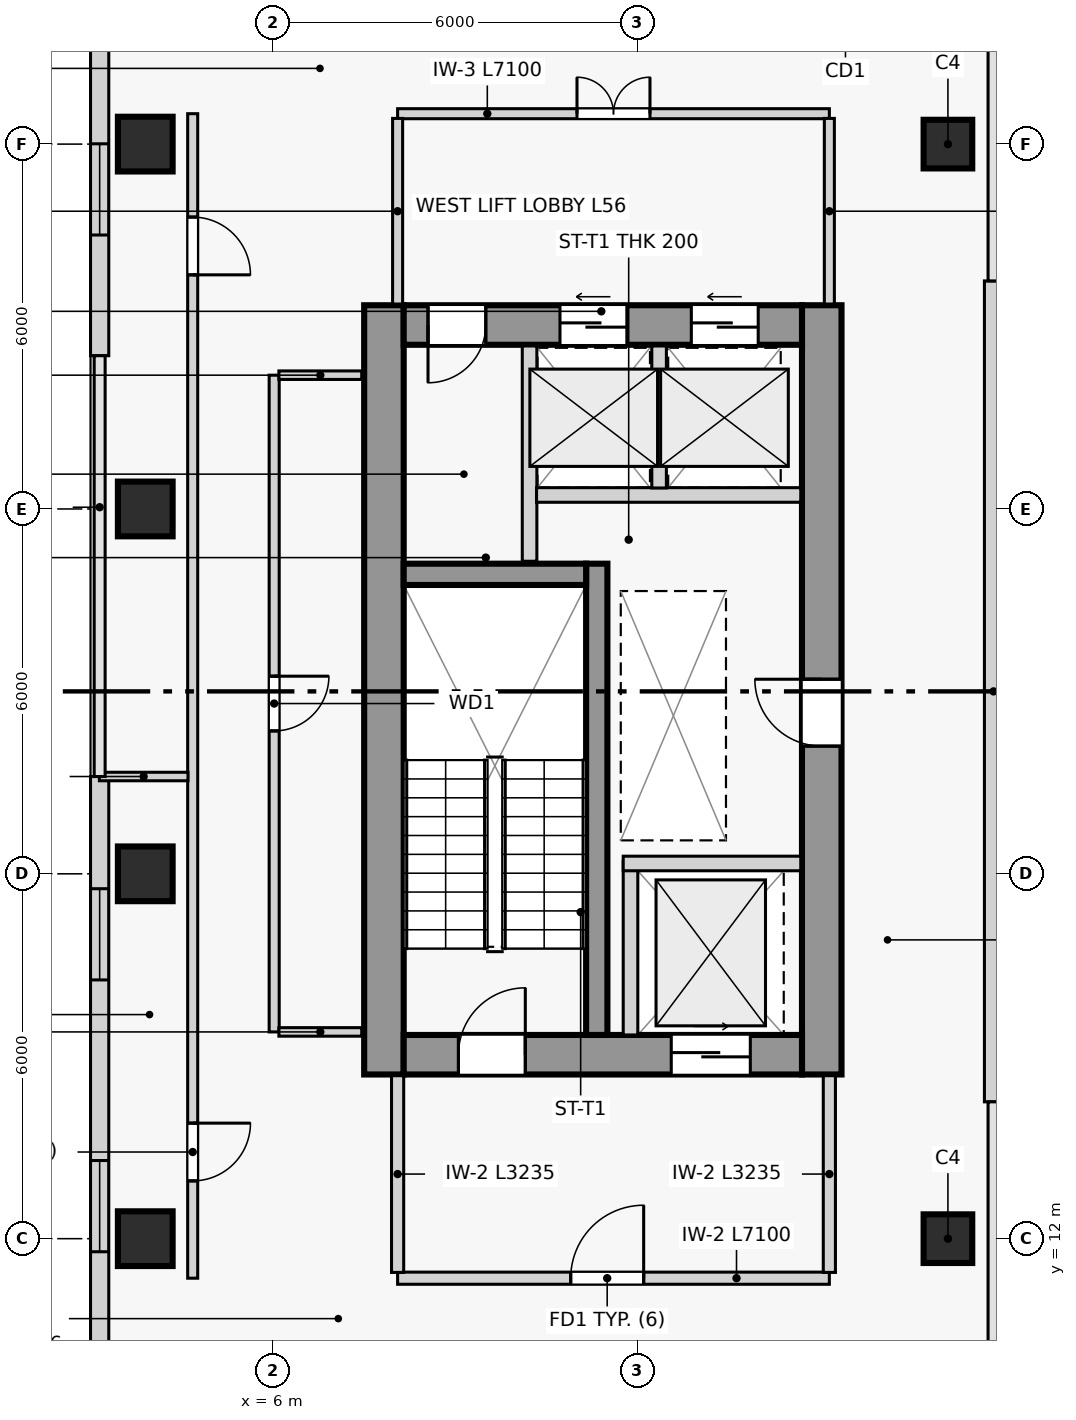
"""IFC4 building model, lengths in metres.
Left out: names, types, materials, properties, quantities, classifications, styles, units other than length and angle.
Written with IfcOpenShell. Run it as: python <this file> out.ifc"""

import sys

from ifc_helpers import new_model, si_unit, direction, frame, frame_2d, origin, origin_2d, place, context, subcontext, project, spatial, rectangle, extrude, source, transform, mapped, element, fill, save


model = new_model("IFC4")
c1 = context("Model", 3, precision=1e-05, world=origin(), true_north=direction((0.0, 1.0)))
c2 = subcontext(c1, "Body", "Model", "MODEL_VIEW")
j1 = project(units=[si_unit("LENGTHUNIT", "METRE"), si_unit("PLANEANGLEUNIT", "RADIAN")], contexts=[c1])
p1 = place(None, origin())
s1 = spatial("IfcSite", under=j1, at=p1, CompositionType="ELEMENT")
p2 = place(p1, origin())
s2 = spatial("IfcBuilding", under=s1, at=p2, CompositionType="ELEMENT")
p3 = place(p2, frame((0.0, 0.0, 213.3)))
s3 = spatial("IfcBuildingStorey", under=s2, at=p3, CompositionType="ELEMENT", Elevation=213.3)
p4 = place(p3, frame((7.825, 14.7, 0.0), z_axis=(0.0, 0.0, 1.0), x_axis=(0.0, 1.0, 0.0)))
e1 = element("IfcWall", 1, at=p4, inside=s3, PredefinedType="SHEAR", context=c2, shape_type="SweptSolid", body=[
    extrude(rectangle(XDim=12.65, YDim=0.65, at=frame_2d((6.325, 0.0))), origin(), (0.0, 0.0, 1.0), 3.6),
])
p5 = place(p3, frame((15.025, 14.7, 0.0), z_axis=(0.0, 0.0, 1.0), x_axis=(0.0, 1.0, 0.0)))
e2 = element("IfcWall", 2, at=p5, inside=s3, PredefinedType="SHEAR", context=c2, shape_type="SweptSolid", body=[
    extrude(rectangle(XDim=12.65, YDim=0.65, at=frame_2d((6.325, 0.0))), origin(), (0.0, 0.0, 1.0), 3.6),
])
p6 = place(p5, frame((5.4, 0.0, 0.0)))
e3 = element("IfcOpeningElement", 3, at=p6, cuts=e2, PredefinedType="OPENING", context=c2, shape_type="SweptSolid", body=[
    extrude(rectangle(XDim=1.1, YDim=2.2, at=frame_2d((0.55, 1.1))), frame((0.0, 0.335, 0.0), z_axis=(0.0, -1.0, 0.0), x_axis=(1.0, 0.0, 0.0)), (0.0, 0.0, 1.0), 0.67),
])
p7 = place(p3, frame((8.15, 15.025, 0.0), z_axis=(0.0, 0.0, 1.0), x_axis=(1.0, 0.0, 0.0)))
e4 = element("IfcWall", 4, at=p7, inside=s3, PredefinedType="SHEAR", context=c2, shape_type="SweptSolid", body=[
    extrude(rectangle(XDim=6.55, YDim=0.65, at=frame_2d((3.275, 0.0))), origin(), (0.0, 0.0, 1.0), 3.6),
])
p8 = place(p7, frame((0.9, 0.0, 0.0)))
e5 = element("IfcOpeningElement", 5, at=p8, cuts=e4, PredefinedType="OPENING", context=c2, shape_type="SweptSolid", body=[
    extrude(rectangle(XDim=1.1, YDim=2.2, at=frame_2d((0.55, 1.1))), frame((0.0, 0.335, 0.0), z_axis=(0.0, -1.0, 0.0), x_axis=(1.0, 0.0, 0.0)), (0.0, 0.0, 1.0), 0.67),
])
p9 = place(p7, frame((4.4, 0.0, 0.0)))
e6 = element("IfcOpeningElement", 6, at=p9, cuts=e4, PredefinedType="OPENING", context=c2, shape_type="SweptSolid", body=[
    extrude(rectangle(XDim=1.3, YDim=2.2, at=frame_2d((0.65, 1.1))), frame((0.0, 0.335, 0.0), z_axis=(0.0, -1.0, 0.0), x_axis=(1.0, 0.0, 0.0)), (0.0, 0.0, 1.0), 0.67),
])
p10 = place(p3, frame((8.15, 27.025, 0.0), z_axis=(0.0, 0.0, 1.0), x_axis=(1.0, 0.0, 0.0)))
e7 = element("IfcWall", 7, at=p10, inside=s3, PredefinedType="SHEAR", context=c2, shape_type="SweptSolid", body=[
    extrude(rectangle(XDim=6.55, YDim=0.65, at=frame_2d((3.275, 0.0))), origin(), (0.0, 0.0, 1.0), 3.6),
])
p11 = place(p10, frame((0.4, 0.0, 0.0)))
e8 = element("IfcOpeningElement", 8, at=p11, cuts=e7, PredefinedType="OPENING", context=c2, shape_type="SweptSolid", body=[
    extrude(rectangle(XDim=0.95, YDim=2.1, at=frame_2d((0.475, 1.05))), frame((0.0, 0.335, 0.0), z_axis=(0.0, -1.0, 0.0), x_axis=(1.0, 0.0, 0.0)), (0.0, 0.0, 1.0), 0.67),
])
p12 = place(p10, frame((2.57, 0.0, 0.0)))
e9 = element("IfcOpeningElement", 9, at=p12, cuts=e7, PredefinedType="OPENING", context=c2, shape_type="SweptSolid", body=[
    extrude(rectangle(XDim=1.1, YDim=2.2, at=frame_2d((0.55, 1.1))), frame((0.0, 0.335, 0.0), z_axis=(0.0, -1.0, 0.0), x_axis=(1.0, 0.0, 0.0)), (0.0, 0.0, 1.0), 0.67),
])
p13 = place(p10, frame((4.73, 0.0, 0.0)))
e10 = element("IfcOpeningElement", 10, at=p13, cuts=e7, PredefinedType="OPENING", context=c2, shape_type="SweptSolid", body=[
    extrude(rectangle(XDim=1.1, YDim=2.2, at=frame_2d((0.55, 1.1))), frame((0.0, 0.335, 0.0), z_axis=(0.0, -1.0, 0.0), x_axis=(1.0, 0.0, 0.0)), (0.0, 0.0, 1.0), 0.67),
])
p14 = place(p3, frame((11.325, 15.35, 0.0), z_axis=(0.0, 0.0, 1.0), x_axis=(0.0, 1.0, 0.0)))
e11 = element("IfcWall", 11, at=p14, inside=s3, PredefinedType="SHEAR", context=c2, shape_type="SweptSolid", body=[
    extrude(rectangle(XDim=7.75, YDim=0.35, at=frame_2d((3.875, 0.0))), origin(), (0.0, 0.0, 1.0), 3.6),
])
p15 = place(p3, frame((8.15, 22.925, 0.0), z_axis=(0.0, 0.0, 1.0), x_axis=(1.0, 0.0, 0.0)))
e12 = element("IfcWall", 12, at=p15, inside=s3, PredefinedType="SHEAR", context=c2, shape_type="SweptSolid", body=[
    extrude(rectangle(XDim=3.0, YDim=0.35, at=frame_2d((1.5, 0.0))), origin(), (0.0, 0.0, 1.0), 3.6),
])
m1 = source(origin(), c2, "Body", "SweptSolid", [
    extrude(rectangle(XDim=0.9, YDim=0.9, at=origin_2d()), origin(), (0.0, 0.0, 1.0), 3.6),
])
for number, where, z_axis, x_axis in (
    (13, (3.9, 12.0, 0.0), (0.0, 0.0, 1.0), (1.0, 0.0, 0.0)),
    (14, (3.9, 18.0, 0.0), (0.0, 0.0, 1.0), (1.0, 0.0, 0.0)),
    (15, (3.9, 24.0, 0.0), (0.0, 0.0, 1.0), (1.0, 0.0, 0.0)),
    (16, (3.9, 30.0, 0.0), (0.0, 0.0, 1.0), (1.0, 0.0, 0.0)),
):
    element("IfcColumn", number, at=place(p3, frame(where, z_axis=z_axis, x_axis=x_axis)), inside=s3, PredefinedType="COLUMN", context=c2, shape_type="MappedRepresentation", body=[
        mapped(m1, transform((0.0, 0.0, 0.0), scale=1.0)),
    ])
m2 = source(origin(), c2, "Body", "SweptSolid", [
    extrude(rectangle(XDim=0.8, YDim=0.8, at=origin_2d()), origin(), (0.0, 0.0, 1.0), 3.6),
])
for number, where, z_axis, x_axis in (
    (17, (17.1, 12.0, 0.0), (0.0, 0.0, 1.0), (1.0, 0.0, 0.0)),
    (18, (17.1, 30.0, 0.0), (0.0, 0.0, 1.0), (1.0, 0.0, 0.0)),
):
    element("IfcColumn", number, at=place(p3, frame(where, z_axis=z_axis, x_axis=x_axis)), inside=s3, PredefinedType="COLUMN", context=c2, shape_type="MappedRepresentation", body=[
        mapped(m2, transform((0.0, 0.0, 0.0), scale=1.0)),
    ])
p16 = place(p3, frame((17.85, 14.25, 0.0), z_axis=(0.0, 0.0, 1.0), x_axis=(0.0, 1.0, 0.0)))
e19 = element("IfcWall", 19, at=p16, inside=s3, PredefinedType="SOLIDWALL", context=c2, shape_type="SweptSolid", body=[
    extrude(rectangle(XDim=13.5, YDim=0.3, at=frame_2d((6.75, 0.0))), origin(), (0.0, 0.0, 1.0), 2.95),
])
p17 = place(p3, frame((3.15, 38.25, 0.0), z_axis=(0.0, 0.0, 1.0), x_axis=(0.0, -1.0, 0.0)))
e20 = element("IfcWall", 20, at=p17, inside=s3, PredefinedType="SOLIDWALL", context=c2, shape_type="SweptSolid", body=[
    extrude(rectangle(XDim=11.73, YDim=0.3, at=frame_2d((5.865, 0.0))), origin(), (0.0, 0.0, 1.0), 2.95),
])
p18 = place(p17, frame((2.48, 0.0, 0.85)))
e21 = element("IfcOpeningElement", 21, at=p18, cuts=e20, PredefinedType="OPENING", context=c2, shape_type="SweptSolid", body=[
    extrude(rectangle(XDim=1.5, YDim=1.8, at=frame_2d((0.75, 0.9))), frame((0.0, 0.16, 0.0), z_axis=(0.0, -1.0, 0.0), x_axis=(1.0, 0.0, 0.0)), (0.0, 0.0, 1.0), 0.32),
])
p19 = place(p17, frame((8.245, 0.0, 0.85)))
e22 = element("IfcOpeningElement", 22, at=p19, cuts=e20, PredefinedType="OPENING", context=c2, shape_type="SweptSolid", body=[
    extrude(rectangle(XDim=1.5, YDim=1.8, at=frame_2d((0.75, 0.9))), frame((0.0, 0.16, 0.0), z_axis=(0.0, -1.0, 0.0), x_axis=(1.0, 0.0, 0.0)), (0.0, 0.0, 1.0), 0.32),
])
p20 = place(p3, frame((3.15, 19.6, 0.0), z_axis=(0.0, 0.0, 1.0), x_axis=(0.0, -1.0, 0.0)))
e23 = element("IfcWall", 23, at=p20, inside=s3, PredefinedType="SOLIDWALL", context=c2, shape_type="SweptSolid", body=[
    extrude(rectangle(XDim=15.85, YDim=0.3, at=frame_2d((7.925, 0.0))), origin(), (0.0, 0.0, 1.0), 2.95),
])
p21 = place(p20, frame((1.845, 0.0, 0.85)))
e24 = element("IfcOpeningElement", 24, at=p21, cuts=e23, PredefinedType="OPENING", context=c2, shape_type="SweptSolid", body=[
    extrude(rectangle(XDim=1.5, YDim=1.8, at=frame_2d((0.75, 0.9))), frame((0.0, 0.16, 0.0), z_axis=(0.0, -1.0, 0.0), x_axis=(1.0, 0.0, 0.0)), (0.0, 0.0, 1.0), 0.32),
])
p22 = place(p20, frame((6.315, 0.0, 0.85)))
e25 = element("IfcOpeningElement", 25, at=p22, cuts=e23, PredefinedType="OPENING", context=c2, shape_type="SweptSolid", body=[
    extrude(rectangle(XDim=1.5, YDim=1.8, at=frame_2d((0.75, 0.9))), frame((0.0, 0.16, 0.0), z_axis=(0.0, -1.0, 0.0), x_axis=(1.0, 0.0, 0.0)), (0.0, 0.0, 1.0), 0.32),
])
p23 = place(p20, frame((11.905, 0.0, 0.85)))
e26 = element("IfcOpeningElement", 26, at=p23, cuts=e23, PredefinedType="OPENING", context=c2, shape_type="SweptSolid", body=[
    extrude(rectangle(XDim=1.5, YDim=1.8, at=frame_2d((0.75, 0.9))), frame((0.0, 0.16, 0.0), z_axis=(0.0, -1.0, 0.0), x_axis=(1.0, 0.0, 0.0)), (0.0, 0.0, 1.0), 0.32),
])
p24 = place(p3, frame((11.88, 15.35, 0.0), z_axis=(0.0, 0.0, 1.0), x_axis=(0.0, 1.0, 0.0)))
e27 = element("IfcWall", 27, at=p24, inside=s3, PredefinedType="PARTITIONING", context=c2, shape_type="SweptSolid", body=[
    extrude(rectangle(XDim=2.85, YDim=0.24, at=frame_2d((1.425, 0.0))), origin(), (0.0, 0.0, 1.0), 2.95),
])
p25 = place(p3, frame((11.76, 18.17, 0.0), z_axis=(0.0, 0.0, 1.0), x_axis=(1.0, 0.0, 0.0)))
e28 = element("IfcWall", 28, at=p25, inside=s3, PredefinedType="PARTITIONING", context=c2, shape_type="SweptSolid", body=[
    extrude(rectangle(XDim=2.92, YDim=0.24, at=frame_2d((1.46, 0.0))), origin(), (0.0, 0.0, 1.0), 2.95),
])
p26 = place(p3, frame((8.05, 11.35, 0.0), z_axis=(0.0, 0.0, 1.0), x_axis=(1.0, 0.0, 0.0)))
e29 = element("IfcWall", 29, at=p26, inside=s3, PredefinedType="PARTITIONING", context=c2, shape_type="SweptSolid", body=[
    extrude(rectangle(XDim=7.1, YDim=0.2, at=frame_2d((3.55, 0.0))), origin(), (0.0, 0.0, 1.0), 2.95),
])
p27 = place(p26, frame((2.846, 0.0, 0.0)))
e30 = element("IfcOpeningElement", 30, at=p27, cuts=e29, PredefinedType="OPENING", context=c2, shape_type="SweptSolid", body=[
    extrude(rectangle(XDim=1.2, YDim=2.2, at=frame_2d((0.6, 1.1))), frame((0.0, 0.11, 0.0), z_axis=(0.0, -1.0, 0.0), x_axis=(1.0, 0.0, 0.0)), (0.0, 0.0, 1.0), 0.22),
])
for number, where, z_axis, x_axis in (
    (31, (8.05, 11.445, 0.0), (0.0, 0.0, 1.0), (0.0, 1.0, 0.0)),
    (32, (15.15, 11.445, 0.0), (0.0, 0.0, 1.0), (0.0, 1.0, 0.0)),
):
    element("IfcWall", number, at=place(p3, frame(where, z_axis=z_axis, x_axis=x_axis)), inside=s3, PredefinedType="PARTITIONING", context=c2, shape_type="SweptSolid", body=[
        extrude(rectangle(XDim=3.235, YDim=0.2, at=frame_2d((1.617, 0.0))), origin(), (0.0, 0.0, 1.0), 2.95),
    ])
p28 = place(p3, frame((10.22, 23.14, 0.0), z_axis=(0.0, 0.0, 1.0), x_axis=(0.0, 1.0, 0.0)))
e33 = element("IfcWall", 33, at=p28, inside=s3, PredefinedType="PARTITIONING", context=c2, shape_type="SweptSolid", body=[
    extrude(rectangle(XDim=3.54, YDim=0.24, at=frame_2d((1.77, 0.0))), origin(), (0.0, 0.0, 1.0), 2.95),
])
p29 = place(p3, frame((10.335, 24.23, 0.0), z_axis=(0.0, 0.0, 1.0), x_axis=(1.0, 0.0, 0.0)))
e34 = element("IfcWall", 34, at=p29, inside=s3, PredefinedType="PARTITIONING", context=c2, shape_type="SweptSolid", body=[
    extrude(rectangle(XDim=4.345, YDim=0.24, at=frame_2d((2.172, 0.0))), origin(), (0.0, 0.0, 1.0), 2.95),
])
p30 = place(p3, frame((12.35, 24.345, 0.0), z_axis=(0.0, 0.0, 1.0), x_axis=(0.0, 1.0, 0.0)))
e35 = element("IfcWall", 35, at=p30, inside=s3, PredefinedType="PARTITIONING", context=c2, shape_type="SweptSolid", body=[
    extrude(rectangle(XDim=2.335, YDim=0.24, at=frame_2d((1.167, 0.0))), origin(), (0.0, 0.0, 1.0), 2.95),
])
p31 = place(p3, frame((8.05, 30.5, 0.0), z_axis=(0.0, 0.0, 1.0), x_axis=(1.0, 0.0, 0.0)))
e36 = element("IfcWall", 36, at=p31, inside=s3, PredefinedType="PARTITIONING", context=c2, shape_type="SweptSolid", body=[
    extrude(rectangle(XDim=7.1, YDim=0.165, at=frame_2d((3.55, 0.0))), origin(), (0.0, 0.0, 1.0), 2.95),
])
p32 = place(p31, frame((2.95, 0.0, 0.0)))
e37 = element("IfcOpeningElement", 37, at=p32, cuts=e36, PredefinedType="OPENING", context=c2, shape_type="SweptSolid", body=[
    extrude(rectangle(XDim=1.2, YDim=2.2, at=frame_2d((0.6, 1.1))), frame((0.0, 0.093, 0.0), z_axis=(0.0, -1.0, 0.0), x_axis=(1.0, 0.0, 0.0)), (0.0, 0.0, 1.0), 0.185),
])
for number, where, z_axis, x_axis in (
    (38, (8.05, 27.37, 0.0), (0.0, 0.0, 1.0), (0.0, 1.0, 0.0)),
    (39, (15.15, 27.37, 0.0), (0.0, 0.0, 1.0), (0.0, 1.0, 0.0)),
):
    element("IfcWall", number, at=place(p3, frame(where, z_axis=z_axis, x_axis=x_axis)), inside=s3, PredefinedType="PARTITIONING", context=c2, shape_type="SweptSolid", body=[
        extrude(rectangle(XDim=3.052, YDim=0.165, at=frame_2d((1.526, 0.0))), origin(), (0.0, 0.0, 1.0), 2.95),
    ])
p33 = place(p3, frame((6.02, 15.4, 0.0), z_axis=(0.0, 0.0, 1.0), x_axis=(0.0, 1.0, 0.0)))
e40 = element("IfcWall", 40, at=p33, inside=s3, PredefinedType="PARTITIONING", context=c2, shape_type="SweptSolid", body=[
    extrude(rectangle(XDim=10.8, YDim=0.165, at=frame_2d((5.4, 0.0))), origin(), (0.0, 0.0, 1.0), 2.95),
])
p34 = place(p33, frame((4.95, 0.0, 0.0)))
e41 = element("IfcOpeningElement", 41, at=p34, cuts=e40, PredefinedType="OPENING", context=c2, shape_type="SweptSolid", body=[
    extrude(rectangle(XDim=0.9, YDim=2.1, at=frame_2d((0.45, 1.05))), frame((0.0, 0.093, 0.0), z_axis=(0.0, -1.0, 0.0), x_axis=(1.0, 0.0, 0.0)), (0.0, 0.0, 1.0), 0.185),
])
for number, where, z_axis, x_axis in (
    (42, (6.097, 15.4, 0.0), (0.0, 0.0, 1.0), (1.0, 0.0, 0.0)),
    (43, (6.097, 26.2, 0.0), (0.0, 0.0, 1.0), (1.0, 0.0, 0.0)),
):
    element("IfcWall", number, at=place(p3, frame(where, z_axis=z_axis, x_axis=x_axis)), inside=s3, PredefinedType="PARTITIONING", context=c2, shape_type="SweptSolid", body=[
        extrude(rectangle(XDim=1.363, YDim=0.14, at=frame_2d((0.681, 0.0))), origin(), (0.0, 0.0, 1.0), 2.95),
    ])
p35 = place(p3, frame((4.68, 11.35, 0.0), z_axis=(0.0, 0.0, 1.0), x_axis=(0.0, 1.0, 0.0)))
e44 = element("IfcWall", 44, at=p35, inside=s3, PredefinedType="PARTITIONING", context=c2, shape_type="SweptSolid", body=[
    extrude(rectangle(XDim=19.15, YDim=0.165, at=frame_2d((9.575, 0.0))), origin(), (0.0, 0.0, 1.0), 2.95),
])
p36 = place(p35, frame((1.6, 0.0, 0.0)))
e45 = element("IfcOpeningElement", 45, at=p36, cuts=e44, PredefinedType="OPENING", context=c2, shape_type="SweptSolid", body=[
    extrude(rectangle(XDim=0.95, YDim=2.1, at=frame_2d((0.475, 1.05))), frame((0.0, 0.093, 0.0), z_axis=(0.0, -1.0, 0.0), x_axis=(1.0, 0.0, 0.0)), (0.0, 0.0, 1.0), 0.185),
])
p37 = place(p35, frame((16.5, 0.0, 0.0)))
e46 = element("IfcOpeningElement", 46, at=p37, cuts=e44, PredefinedType="OPENING", context=c2, shape_type="SweptSolid", body=[
    extrude(rectangle(XDim=0.95, YDim=2.1, at=frame_2d((0.475, 1.05))), frame((0.0, 0.093, 0.0), z_axis=(0.0, -1.0, 0.0), x_axis=(1.0, 0.0, 0.0)), (0.0, 0.0, 1.0), 0.185),
])
p38 = place(p3, frame((3.145, 19.6, 0.0), z_axis=(0.0, 0.0, 1.0), x_axis=(1.0, 0.0, 0.0)))
e47 = element("IfcWall", 47, at=p38, inside=s3, PredefinedType="PARTITIONING", context=c2, shape_type="SweptSolid", body=[
    extrude(rectangle(XDim=1.458, YDim=0.14, at=frame_2d((0.729, 0.0))), origin(), (0.0, 0.0, 1.0), 2.95),
])
m3 = source(origin(), c2, "Body", "SweptSolid", [
    extrude(rectangle(XDim=1.5, YDim=1.8, at=frame_2d((0.75, 0.9))), frame((0.0, 0.03, 0.0), z_axis=(0.0, -1.0, 0.0), x_axis=(1.0, 0.0, 0.0)), (0.0, 0.0, 1.0), 0.06),
])
p39 = place(p19, origin())
e48 = element("IfcWindow", 48, at=p39, inside=s3, PartitioningType="SINGLE_PANEL", PredefinedType="WINDOW", context=c2, shape_type="MappedRepresentation", body=[
    mapped(m3, transform((0.0, 0.0, 0.0), scale=1.0)),
])
fill(e22, e48)
p40 = place(p21, origin())
e49 = element("IfcWindow", 49, at=p40, inside=s3, PartitioningType="SINGLE_PANEL", PredefinedType="WINDOW", context=c2, shape_type="MappedRepresentation", body=[
    mapped(m3, transform((0.0, 0.0, 0.0), scale=1.0)),
])
fill(e24, e49)
p41 = place(p22, origin())
e50 = element("IfcWindow", 50, at=p41, inside=s3, PartitioningType="SINGLE_PANEL", PredefinedType="WINDOW", context=c2, shape_type="MappedRepresentation", body=[
    mapped(m3, transform((0.0, 0.0, 0.0), scale=1.0)),
])
fill(e25, e50)
m4 = source(origin(), c2, "Body", "SweptSolid", [
    extrude(rectangle(XDim=1.1, YDim=2.2, at=frame_2d((0.55, 1.1))), frame((0.0, 0.025, 0.0), z_axis=(0.0, -1.0, 0.0), x_axis=(1.0, 0.0, 0.0)), (0.0, 0.0, 1.0), 0.05),
])
p42 = place(p8, origin())
e51 = element("IfcDoor", 51, at=p42, inside=s3, OperationType="SINGLE_SWING_RIGHT", PredefinedType="DOOR", context=c2, shape_type="MappedRepresentation", body=[
    mapped(m4, transform((0.0, 0.0, 0.0), scale=1.0)),
])
fill(e5, e51)
m5 = source(origin(), c2, "Body", "SweptSolid", [
    extrude(rectangle(XDim=1.3, YDim=2.2, at=frame_2d((0.65, 1.1))), frame((0.0, 0.025, 0.0), z_axis=(0.0, -1.0, 0.0), x_axis=(1.0, 0.0, 0.0)), (0.0, 0.0, 1.0), 0.05),
])
p43 = place(p9, origin())
e52 = element("IfcDoor", 52, at=p43, inside=s3, OperationType="SLIDING_TO_RIGHT", PredefinedType="DOOR", context=c2, shape_type="MappedRepresentation", body=[
    mapped(m5, transform((0.0, 0.0, 0.0), scale=1.0)),
])
fill(e6, e52)
m6 = source(origin(), c2, "Body", "SweptSolid", [
    extrude(rectangle(XDim=1.2, YDim=2.2, at=frame_2d((0.6, 1.1))), frame((0.0, 0.025, 0.0), z_axis=(0.0, -1.0, 0.0), x_axis=(1.0, 0.0, 0.0)), (0.0, 0.0, 1.0), 0.05),
])
p44 = place(p27, origin())
e53 = element("IfcDoor", 53, at=p44, inside=s3, OperationType="SINGLE_SWING_RIGHT", PredefinedType="DOOR", context=c2, shape_type="MappedRepresentation", body=[
    mapped(m6, transform((0.0, 0.0, 0.0), scale=1.0)),
])
fill(e30, e53)
m7 = source(origin(), c2, "Body", "SweptSolid", [
    extrude(rectangle(XDim=0.95, YDim=2.1, at=frame_2d((0.475, 1.05))), frame((0.0, 0.025, 0.0), z_axis=(0.0, -1.0, 0.0), x_axis=(1.0, 0.0, 0.0)), (0.0, 0.0, 1.0), 0.05),
])
p45 = place(p11, frame((0.95, 0.0, 0.0), z_axis=(0.0, 0.0, 1.0), x_axis=(-1.0, 0.0, 0.0)))
e54 = element("IfcDoor", 54, at=p45, inside=s3, OperationType="SINGLE_SWING_RIGHT", PredefinedType="DOOR", context=c2, shape_type="MappedRepresentation", body=[
    mapped(m7, transform((0.0, 0.0, 0.0), scale=1.0)),
])
fill(e8, e54)
m8 = source(origin(), c2, "Body", "SweptSolid", [
    extrude(rectangle(XDim=1.1, YDim=2.2, at=frame_2d((0.55, 1.1))), frame((0.0, 0.025, 0.0), z_axis=(0.0, -1.0, 0.0), x_axis=(1.0, 0.0, 0.0)), (0.0, 0.0, 1.0), 0.05),
])
p46 = place(p12, origin())
e55 = element("IfcDoor", 55, at=p46, inside=s3, OperationType="SLIDING_TO_LEFT", PredefinedType="DOOR", context=c2, shape_type="MappedRepresentation", body=[
    mapped(m8, transform((0.0, 0.0, 0.0), scale=1.0)),
])
fill(e9, e55)
p47 = place(p13, origin())
e56 = element("IfcDoor", 56, at=p47, inside=s3, OperationType="SLIDING_TO_LEFT", PredefinedType="DOOR", context=c2, shape_type="MappedRepresentation", body=[
    mapped(m8, transform((0.0, 0.0, 0.0), scale=1.0)),
])
fill(e10, e56)
p48 = place(p32, origin())
e57 = element("IfcDoor", 57, at=p48, inside=s3, OperationType="DOUBLE_DOOR_SINGLE_SWING", PredefinedType="DOOR", context=c2, shape_type="MappedRepresentation", body=[
    mapped(m6, transform((0.0, 0.0, 0.0), scale=1.0)),
])
fill(e37, e57)
p49 = place(p6, origin())
e58 = element("IfcDoor", 58, at=p49, inside=s3, OperationType="SINGLE_SWING_RIGHT", PredefinedType="DOOR", context=c2, shape_type="MappedRepresentation", body=[
    mapped(m4, transform((0.0, 0.0, 0.0), scale=1.0)),
])
fill(e3, e58)
m9 = source(origin(), c2, "Body", "SweptSolid", [
    extrude(rectangle(XDim=0.9, YDim=2.1, at=frame_2d((0.45, 1.05))), frame((0.0, 0.025, 0.0), z_axis=(0.0, -1.0, 0.0), x_axis=(1.0, 0.0, 0.0)), (0.0, 0.0, 1.0), 0.05),
])
p50 = place(p34, frame((0.9, 0.0, 0.0), z_axis=(0.0, 0.0, 1.0), x_axis=(-1.0, 0.0, 0.0)))
e59 = element("IfcDoor", 59, at=p50, inside=s3, OperationType="SINGLE_SWING_LEFT", PredefinedType="DOOR", context=c2, shape_type="MappedRepresentation", body=[
    mapped(m9, transform((0.0, 0.0, 0.0), scale=1.0)),
])
fill(e41, e59)
p51 = place(p36, frame((0.95, 0.0, 0.0), z_axis=(0.0, 0.0, 1.0), x_axis=(-1.0, 0.0, 0.0)))
e60 = element("IfcDoor", 60, at=p51, inside=s3, OperationType="SINGLE_SWING_LEFT", PredefinedType="DOOR", context=c2, shape_type="MappedRepresentation", body=[
    mapped(m7, transform((0.0, 0.0, 0.0), scale=1.0)),
])
fill(e45, e60)
p52 = place(p37, frame((0.95, 0.0, 0.0), z_axis=(0.0, 0.0, 1.0), x_axis=(-1.0, 0.0, 0.0)))
e61 = element("IfcDoor", 61, at=p52, inside=s3, OperationType="SINGLE_SWING_RIGHT", PredefinedType="DOOR", context=c2, shape_type="MappedRepresentation", body=[
    mapped(m7, transform((0.0, 0.0, 0.0), scale=1.0)),
])
fill(e46, e61)
save(model, sys.argv[1])
